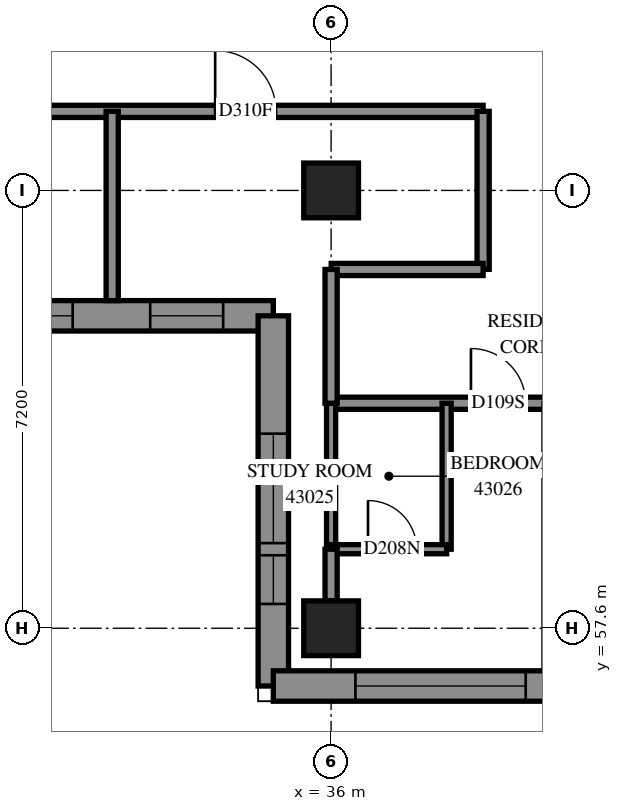
"""IFC4 building model, lengths in metres.
Left out: names, types, materials, properties, quantities, classifications, styles, units other than length and angle.
Written with IfcOpenShell. Run it as: python <this file> out.ifc"""

import sys

from ifc_helpers import new_model, si_unit, direction, frame, frame_2d, origin, origin_2d, place, context, subcontext, project, spatial, polyline, rectangle, outline, extrude, element, fill, save


model = new_model("IFC4")
c1 = context("Model", 3, precision=1e-05, world=origin(), true_north=direction((0.0, 1.0)))
c2 = subcontext(c1, "Body", "Model", "MODEL_VIEW")
j1 = project(units=[si_unit("LENGTHUNIT", "METRE"), si_unit("PLANEANGLEUNIT", "RADIAN")], contexts=[c1])
p1 = place(None, origin())
s1 = spatial("IfcSite", under=j1, at=p1, CompositionType="ELEMENT")
p2 = place(p1, origin())
s2 = spatial("IfcBuilding", under=s1, at=p2, CompositionType="ELEMENT")
p3 = place(p2, frame((0.0, 0.0, 159.2)))
s3 = spatial("IfcBuildingStorey", under=s2, at=p3, CompositionType="ELEMENT", Elevation=159.2)
for number, where, z_axis, x_axis in (
    (1, (36.0, 57.6, 0.0), (0.0, 0.0, 1.0), (1.0, 0.0, 0.0)),
    (2, (36.0, 64.8, 0.0), (0.0, 0.0, 1.0), (1.0, 0.0, 0.0)),
):
    element("IfcColumn", number, at=place(p3, frame(where, z_axis=z_axis, x_axis=x_axis)), inside=s3, PredefinedType="COLUMN", context=c2, shape_type="SweptSolid", body=[
        extrude(rectangle(XDim=0.9, YDim=0.9, at=origin_2d()), origin(), (0.0, 0.0, 1.0), 3.1),
    ])
p4 = place(p3, frame((19.538, 62.738, 0.0), z_axis=(0.0, 0.0, 1.0), x_axis=(1.0, 0.0, 0.0)))
e3 = element("IfcWall", 3, at=p4, inside=s3, PredefinedType="SOLIDWALL", context=c2, shape_type="SweptSolid", body=[
    extrude(outline(polyline([(-0.25, -0.25), (15.262, -0.25), (15.762, 0.25), (0.25, 0.25), (-0.25, -0.25)])), origin(), (0.0, 0.0, 1.0), 3.1),
])
p5 = place(p4, frame((2.462, 0.0, 0.45)))
e4 = element("IfcOpeningElement", 4, at=p5, cuts=e3, PredefinedType="OPENING", context=c2, shape_type="SweptSolid", body=[
    extrude(rectangle(XDim=2.8, YDim=2.5, at=frame_2d((1.4, 1.25))), frame((0.0, 0.26, 0.0), z_axis=(0.0, -1.0, 0.0), x_axis=(1.0, 0.0, 0.0)), (0.0, 0.0, 1.0), 0.52),
])
p6 = place(p4, frame((6.062, 0.0, 0.45)))
e5 = element("IfcOpeningElement", 5, at=p6, cuts=e3, PredefinedType="OPENING", context=c2, shape_type="SweptSolid", body=[
    extrude(rectangle(XDim=2.8, YDim=2.5, at=frame_2d((1.4, 1.25))), frame((0.0, 0.26, 0.0), z_axis=(0.0, -1.0, 0.0), x_axis=(1.0, 0.0, 0.0)), (0.0, 0.0, 1.0), 0.52),
])
p7 = place(p4, frame((9.412, 0.0, 0.45)))
e6 = element("IfcOpeningElement", 6, at=p7, cuts=e3, PredefinedType="OPENING", context=c2, shape_type="SweptSolid", body=[
    extrude(rectangle(XDim=2.8, YDim=2.5, at=frame_2d((1.4, 1.25))), frame((0.0, 0.26, 0.0), z_axis=(0.0, -1.0, 0.0), x_axis=(1.0, 0.0, 0.0)), (0.0, 0.0, 1.0), 0.52),
])
p8 = place(p4, frame((0.656, 0.0, 0.45)))
e7 = element("IfcOpeningElement", 7, at=p8, cuts=e3, PredefinedType="OPENING", context=c2, shape_type="SweptSolid", body=[
    extrude(rectangle(XDim=1.2, YDim=2.5, at=frame_2d((0.6, 1.25))), frame((0.0, 0.26, 0.0), z_axis=(0.0, -1.0, 0.0), x_axis=(1.0, 0.0, 0.0)), (0.0, 0.0, 1.0), 0.52),
])
p9 = place(p4, frame((13.487, 0.0, 0.45)))
e8 = element("IfcOpeningElement", 8, at=p9, cuts=e3, PredefinedType="OPENING", context=c2, shape_type="SweptSolid", body=[
    extrude(rectangle(XDim=1.2, YDim=2.5, at=frame_2d((0.6, 1.25))), frame((0.0, 0.26, 0.0), z_axis=(0.0, -1.0, 0.0), x_axis=(1.0, 0.0, 0.0)), (0.0, 0.0, 1.0), 0.52),
])
p10 = place(p3, frame((35.05, 62.738, 0.0), z_axis=(0.0, 0.0, 1.0), x_axis=(0.0, -1.0, 0.0)))
e9 = element("IfcWall", 9, at=p10, inside=s3, PredefinedType="SOLIDWALL", context=c2, shape_type="SweptSolid", body=[
    extrude(outline(polyline([(0.25, -0.25), (6.338, -0.25), (5.838, 0.25), (-0.25, 0.25), (0.25, -0.25)])), origin(), (0.0, 0.0, 1.0), 3.1),
])
p11 = place(p10, frame((1.938, 0.0, 0.7)))
e10 = element("IfcOpeningElement", 10, at=p11, cuts=e9, PredefinedType="OPENING", context=c2, shape_type="SweptSolid", body=[
    extrude(rectangle(XDim=1.8, YDim=2.2, at=frame_2d((0.9, 1.1))), frame((0.0, 0.26, 0.0), z_axis=(0.0, -1.0, 0.0), x_axis=(1.0, 0.0, 0.0)), (0.0, 0.0, 1.0), 0.52),
])
p12 = place(p10, frame((3.938, 0.0, 0.45)))
e11 = element("IfcOpeningElement", 11, at=p12, cuts=e9, PredefinedType="OPENING", context=c2, shape_type="SweptSolid", body=[
    extrude(rectangle(XDim=0.8, YDim=2.5, at=frame_2d((0.4, 1.25))), frame((0.0, 0.26, 0.0), z_axis=(0.0, -1.0, 0.0), x_axis=(1.0, 0.0, 0.0)), (0.0, 0.0, 1.0), 0.52),
])
p13 = place(p3, frame((35.05, 56.65, 0.0), z_axis=(0.0, 0.0, 1.0), x_axis=(1.0, 0.0, 0.0)))
e12 = element("IfcWall", 12, at=p13, inside=s3, PredefinedType="SOLIDWALL", context=c2, shape_type="SweptSolid", body=[
    extrude(outline(polyline([(-0.25, -0.25), (6.95, -0.25), (7.45, 0.25), (0.25, 0.25), (-0.25, -0.25)])), origin(), (0.0, 0.0, 1.0), 3.1),
])
p14 = place(p13, frame((1.35, 0.0, 0.45)))
e13 = element("IfcOpeningElement", 13, at=p14, cuts=e12, PredefinedType="OPENING", context=c2, shape_type="SweptSolid", body=[
    extrude(rectangle(XDim=2.8, YDim=2.5, at=frame_2d((1.4, 1.25))), frame((0.0, 0.26, 0.0), z_axis=(0.0, -1.0, 0.0), x_axis=(1.0, 0.0, 0.0)), (0.0, 0.0, 1.0), 0.52),
])
p15 = place(p13, frame((5.175, 0.0, 0.45)))
e14 = element("IfcOpeningElement", 14, at=p15, cuts=e12, PredefinedType="OPENING", context=c2, shape_type="SweptSolid", body=[
    extrude(rectangle(XDim=1.2, YDim=2.5, at=frame_2d((0.6, 1.25))), frame((0.0, 0.26, 0.0), z_axis=(0.0, -1.0, 0.0), x_axis=(1.0, 0.0, 0.0)), (0.0, 0.0, 1.0), 0.52),
])
p16 = place(p3, frame((21.6, 66.1, 0.0), z_axis=(0.0, 0.0, 1.0), x_axis=(1.0, 0.0, 0.0)))
e15 = element("IfcWall", 15, at=p16, inside=s3, PredefinedType="PARTITIONING", context=c2, shape_type="SweptSolid", body=[
    extrude(rectangle(XDim=16.9, YDim=0.2, at=frame_2d((8.45, 0.0))), origin(), (0.0, 0.0, 1.0), 3.1),
])
p17 = place(p16, frame((12.493, 0.0, 0.0)))
e16 = element("IfcOpeningElement", 16, at=p17, cuts=e15, PredefinedType="OPENING", context=c2, shape_type="SweptSolid", body=[
    extrude(rectangle(XDim=1.0, YDim=2.1, at=frame_2d((0.5, 1.05))), frame((0.0, 0.11, 0.0), z_axis=(0.0, -1.0, 0.0), x_axis=(1.0, 0.0, 0.0)), (0.0, 0.0, 1.0), 0.22),
])
p18 = place(p3, frame((36.0, 61.3, 0.0), z_axis=(0.0, 0.0, 1.0), x_axis=(1.0, 0.0, 0.0)))
e17 = element("IfcWall", 17, at=p18, inside=s3, PredefinedType="PARTITIONING", context=c2, shape_type="SweptSolid", body=[
    extrude(rectangle(XDim=16.9, YDim=0.2, at=frame_2d((8.45, 0.0))), origin(), (0.0, 0.0, 1.0), 3.1),
])
p19 = place(p18, frame((2.3, 0.0, 0.0)))
e18 = element("IfcOpeningElement", 18, at=p19, cuts=e17, PredefinedType="OPENING", context=c2, shape_type="SweptSolid", body=[
    extrude(rectangle(XDim=0.9, YDim=2.1, at=frame_2d((0.45, 1.05))), frame((0.0, 0.11, 0.0), z_axis=(0.0, -1.0, 0.0), x_axis=(1.0, 0.0, 0.0)), (0.0, 0.0, 1.0), 0.22),
])
p20 = place(p18, frame((4.125, 0.0, 0.0)))
e19 = element("IfcOpeningElement", 19, at=p20, cuts=e17, PredefinedType="OPENING", context=c2, shape_type="SweptSolid", body=[
    extrude(rectangle(XDim=1.0, YDim=2.1, at=frame_2d((0.5, 1.05))), frame((0.0, 0.11, 0.0), z_axis=(0.0, -1.0, 0.0), x_axis=(1.0, 0.0, 0.0)), (0.0, 0.0, 1.0), 0.22),
])
p21 = place(p18, frame((9.5, 0.0, 0.0)))
e20 = element("IfcOpeningElement", 20, at=p21, cuts=e17, PredefinedType="OPENING", context=c2, shape_type="SweptSolid", body=[
    extrude(rectangle(XDim=0.9, YDim=2.1, at=frame_2d((0.45, 1.05))), frame((0.0, 0.11, 0.0), z_axis=(0.0, -1.0, 0.0), x_axis=(1.0, 0.0, 0.0)), (0.0, 0.0, 1.0), 0.22),
])
p22 = place(p18, frame((11.325, 0.0, 0.0)))
e21 = element("IfcOpeningElement", 21, at=p22, cuts=e17, PredefinedType="OPENING", context=c2, shape_type="SweptSolid", body=[
    extrude(rectangle(XDim=1.0, YDim=2.1, at=frame_2d((0.5, 1.05))), frame((0.0, 0.11, 0.0), z_axis=(0.0, -1.0, 0.0), x_axis=(1.0, 0.0, 0.0)), (0.0, 0.0, 1.0), 0.22),
])
p23 = place(p18, frame((15.647, 0.0, 0.0)))
e22 = element("IfcOpeningElement", 22, at=p23, cuts=e17, PredefinedType="OPENING", context=c2, shape_type="SweptSolid", body=[
    extrude(rectangle(XDim=1.0, YDim=2.1, at=frame_2d((0.5, 1.05))), frame((0.0, 0.11, 0.0), z_axis=(0.0, -1.0, 0.0), x_axis=(1.0, 0.0, 0.0)), (0.0, 0.0, 1.0), 0.22),
])
p24 = place(p3, frame((32.4, 62.988, 0.0), z_axis=(0.0, 0.0, 1.0), x_axis=(0.0, 1.0, 0.0)))
e23 = element("IfcWall", 23, at=p24, inside=s3, PredefinedType="PARTITIONING", context=c2, shape_type="SweptSolid", body=[
    extrude(rectangle(XDim=3.112, YDim=0.2, at=frame_2d((1.556, 0.0))), origin(), (0.0, 0.0, 1.0), 3.1),
])
p25 = place(p3, frame((38.5, 63.502, 0.0), z_axis=(0.0, 0.0, 1.0), x_axis=(0.0, 1.0, 0.0)))
e24 = element("IfcWall", 24, at=p25, inside=s3, PredefinedType="PARTITIONING", context=c2, shape_type="SweptSolid", body=[
    extrude(rectangle(XDim=2.598, YDim=0.2, at=frame_2d((1.299, 0.0))), origin(), (0.0, 0.0, 1.0), 3.1),
])
p26 = place(p3, frame((36.002, 63.5, 0.0), z_axis=(0.0, 0.0, 1.0), x_axis=(1.0, 0.0, 0.0)))
e25 = element("IfcWall", 25, at=p26, inside=s3, PredefinedType="PARTITIONING", context=c2, shape_type="SweptSolid", body=[
    extrude(rectangle(XDim=2.498, YDim=0.2, at=frame_2d((1.249, 0.0))), origin(), (0.0, 0.0, 1.0), 3.1),
])
p27 = place(p3, frame((37.9, 58.9, 0.0), z_axis=(0.0, 0.0, 1.0), x_axis=(0.0, 1.0, 0.0)))
e26 = element("IfcWall", 26, at=p27, inside=s3, PredefinedType="PARTITIONING", context=c2, shape_type="SweptSolid", body=[
    extrude(rectangle(XDim=2.4, YDim=0.15, at=frame_2d((1.2, 0.0))), origin(), (0.0, 0.0, 1.0), 3.1),
])
p28 = place(p3, frame((36.0, 58.9, 0.0), z_axis=(0.0, 0.0, 1.0), x_axis=(0.0, 1.0, 0.0)))
e27 = element("IfcWall", 27, at=p28, inside=s3, PredefinedType="PARTITIONING", context=c2, shape_type="SweptSolid", body=[
    extrude(rectangle(XDim=2.4, YDim=0.15, at=frame_2d((1.2, 0.0))), origin(), (0.0, 0.0, 1.0), 2.6),
])
p29 = place(p3, frame((36.0, 61.3, 0.0), z_axis=(0.0, 0.0, 1.0), x_axis=(0.0, 1.0, 0.0)))
e28 = element("IfcWall", 28, at=p29, inside=s3, PredefinedType="PARTITIONING", context=c2, shape_type="SweptSolid", body=[
    extrude(rectangle(XDim=2.2, YDim=0.2, at=frame_2d((1.1, 0.0))), origin(), (0.0, 0.0, 1.0), 2.6),
])
p30 = place(p3, frame((36.0, 58.9, 0.0), z_axis=(0.0, 0.0, 1.0), x_axis=(1.0, 0.0, 0.0)))
e29 = element("IfcWall", 29, at=p30, inside=s3, PredefinedType="PARTITIONING", context=c2, shape_type="SweptSolid", body=[
    extrude(rectangle(XDim=1.9, YDim=0.15, at=frame_2d((0.95, 0.0))), origin(), (0.0, 0.0, 1.0), 3.1),
])
p31 = place(p30, frame((0.607, 0.0, 0.0)))
e30 = element("IfcOpeningElement", 30, at=p31, cuts=e29, PredefinedType="OPENING", context=c2, shape_type="SweptSolid", body=[
    extrude(rectangle(XDim=0.8, YDim=2.1, at=frame_2d((0.4, 1.05))), frame((0.0, 0.085, 0.0), z_axis=(0.0, -1.0, 0.0), x_axis=(1.0, 0.0, 0.0)), (0.0, 0.0, 1.0), 0.17),
])
p32 = place(p3, frame((36.0, 58.05, 0.0), z_axis=(0.0, 0.0, 1.0), x_axis=(0.0, 1.0, 0.0)))
e31 = element("IfcWall", 31, at=p32, inside=s3, PredefinedType="PARTITIONING", context=c2, shape_type="SweptSolid", body=[
    extrude(rectangle(XDim=0.85, YDim=0.2, at=frame_2d((0.425, 0.0))), origin(), (0.0, 0.0, 1.0), 2.6),
])
p33 = place(p7, origin())
e32 = element("IfcWindow", 32, at=p33, inside=s3, PartitioningType="SINGLE_PANEL", PredefinedType="WINDOW", context=c2, shape_type="SweptSolid", body=[
    extrude(rectangle(XDim=2.8, YDim=2.5, at=frame_2d((1.4, 1.25))), frame((0.0, 0.18, 0.0), z_axis=(0.0, -1.0, 0.0), x_axis=(1.0, 0.0, 0.0)), (0.0, 0.0, 1.0), 0.06),
])
fill(e6, e32)
p34 = place(p9, origin())
e33 = element("IfcWindow", 33, at=p34, inside=s3, PartitioningType="SINGLE_PANEL", PredefinedType="WINDOW", context=c2, shape_type="SweptSolid", body=[
    extrude(rectangle(XDim=1.2, YDim=2.5, at=frame_2d((0.6, 1.25))), frame((0.0, 0.18, 0.0), z_axis=(0.0, -1.0, 0.0), x_axis=(1.0, 0.0, 0.0)), (0.0, 0.0, 1.0), 0.06),
])
fill(e8, e33)
p35 = place(p14, origin())
e34 = element("IfcWindow", 34, at=p35, inside=s3, PartitioningType="SINGLE_PANEL", PredefinedType="WINDOW", context=c2, shape_type="SweptSolid", body=[
    extrude(rectangle(XDim=2.8, YDim=2.5, at=frame_2d((1.4, 1.25))), frame((0.0, 0.18, 0.0), z_axis=(0.0, -1.0, 0.0), x_axis=(1.0, 0.0, 0.0)), (0.0, 0.0, 1.0), 0.06),
])
fill(e13, e34)
p36 = place(p17, origin())
e35 = element("IfcDoor", 35, at=p36, inside=s3, OperationType="SINGLE_SWING_RIGHT", PredefinedType="DOOR", context=c2, shape_type="SweptSolid", body=[
    extrude(rectangle(XDim=1.0, YDim=2.1, at=frame_2d((0.5, 1.05))), frame((0.0, 0.025, 0.0), z_axis=(0.0, -1.0, 0.0), x_axis=(1.0, 0.0, 0.0)), (0.0, 0.0, 1.0), 0.05),
])
fill(e16, e35)
p37 = place(p19, origin())
e36 = element("IfcDoor", 36, at=p37, inside=s3, OperationType="SINGLE_SWING_LEFT", PredefinedType="DOOR", context=c2, shape_type="SweptSolid", body=[
    extrude(rectangle(XDim=0.9, YDim=2.1, at=frame_2d((0.45, 1.05))), frame((0.0, 0.025, 0.0), z_axis=(0.0, -1.0, 0.0), x_axis=(1.0, 0.0, 0.0)), (0.0, 0.0, 1.0), 0.05),
])
fill(e18, e36)
p38 = place(p31, origin())
e37 = element("IfcDoor", 37, at=p38, inside=s3, OperationType="SINGLE_SWING_RIGHT", PredefinedType="DOOR", context=c2, shape_type="SweptSolid", body=[
    extrude(rectangle(XDim=0.8, YDim=2.1, at=frame_2d((0.4, 1.05))), frame((0.0, 0.025, 0.0), z_axis=(0.0, -1.0, 0.0), x_axis=(1.0, 0.0, 0.0)), (0.0, 0.0, 1.0), 0.05),
])
fill(e30, e37)
p39 = place(p11, origin())
e38 = element("IfcWindow", 38, at=p39, inside=s3, PartitioningType="SINGLE_PANEL", PredefinedType="WINDOW", context=c2, shape_type="SweptSolid", body=[
    extrude(rectangle(XDim=1.8, YDim=2.2, at=frame_2d((0.9, 1.1))), frame((0.0, 0.18, 0.0), z_axis=(0.0, -1.0, 0.0), x_axis=(1.0, 0.0, 0.0)), (0.0, 0.0, 1.0), 0.06),
])
fill(e10, e38)
p40 = place(p12, origin())
e39 = element("IfcWindow", 39, at=p40, inside=s3, PartitioningType="SINGLE_PANEL", PredefinedType="WINDOW", context=c2, shape_type="SweptSolid", body=[
    extrude(rectangle(XDim=0.8, YDim=2.5, at=frame_2d((0.4, 1.25))), frame((0.0, 0.18, 0.0), z_axis=(0.0, -1.0, 0.0), x_axis=(1.0, 0.0, 0.0)), (0.0, 0.0, 1.0), 0.06),
])
fill(e11, e39)
save(model, sys.argv[1])
